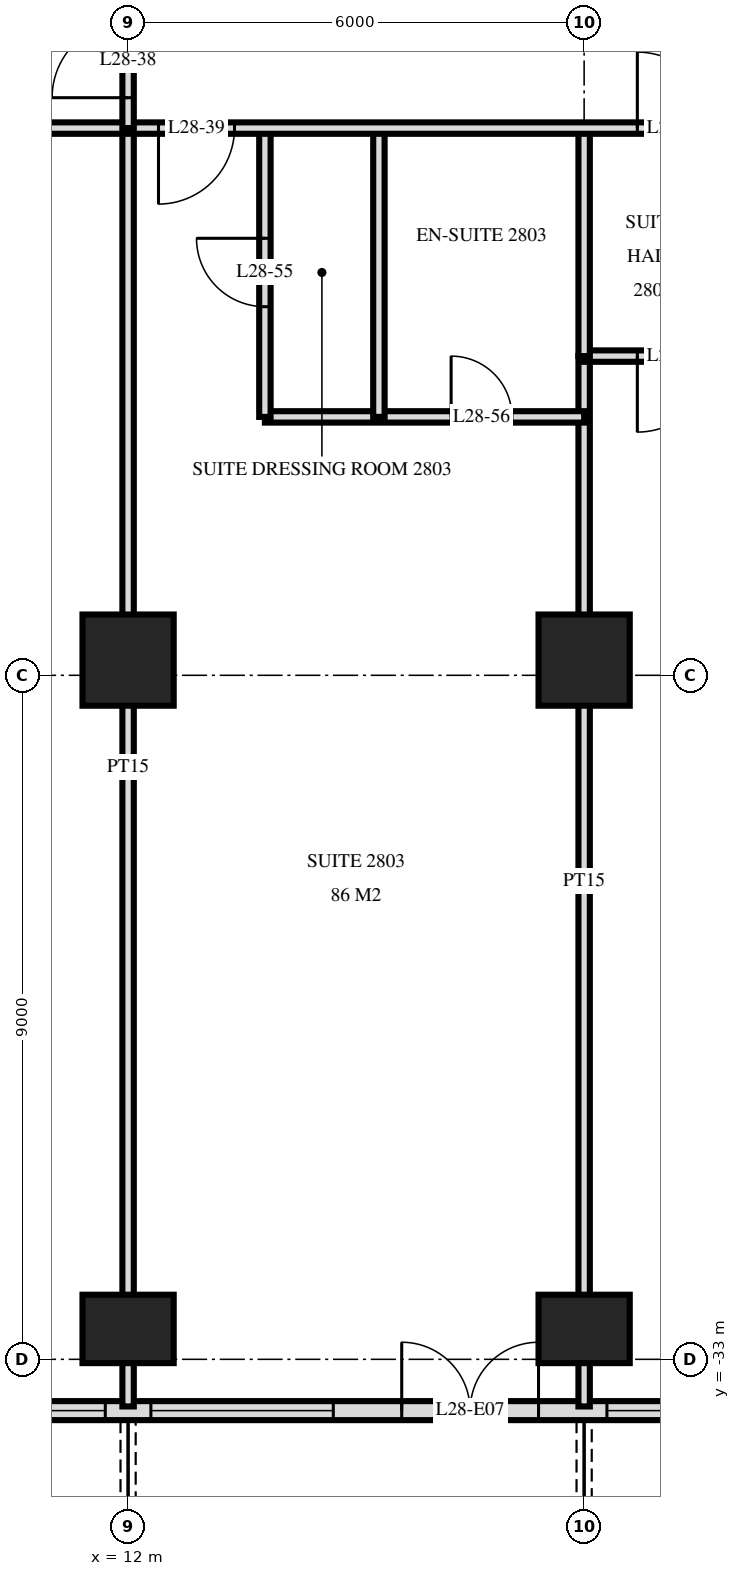
"""IFC4 building model, lengths in metres.
Left out: names, types, materials, properties, quantities, classifications, styles, units other than length and angle.
Written with IfcOpenShell. Run it as: python <this file> out.ifc"""

import sys

from ifc_helpers import new_model, si_unit, direction, frame, frame_2d, origin, origin_2d, place, context, subcontext, project, spatial, rectangle, extrude, element, fill, save


model = new_model("IFC4")
c1 = context("Model", 3, precision=1e-05, world=origin(), true_north=direction((0.0, 1.0)))
c2 = subcontext(c1, "Body", "Model", "MODEL_VIEW")
j1 = project(units=[si_unit("LENGTHUNIT", "METRE"), si_unit("PLANEANGLEUNIT", "RADIAN")], contexts=[c1])
p1 = place(None, origin())
s1 = spatial("IfcSite", under=j1, at=p1, CompositionType="ELEMENT")
p2 = place(p1, origin())
s2 = spatial("IfcBuilding", under=s1, at=p2, CompositionType="ELEMENT")
p3 = place(p2, frame((0.0, 0.0, 112.8)))
s3 = spatial("IfcBuildingStorey", under=s2, at=p3, CompositionType="ELEMENT", Elevation=112.8)
p4 = place(p3, frame((12.0, -32.6, -0.28), z_axis=(0.0, 0.0, 1.0), x_axis=(1.0, 0.0, 0.0)))
e1 = element("IfcColumn", 1, at=p4, inside=s3, PredefinedType="COLUMN", context=c2, shape_type="SweptSolid", body=[
    extrude(rectangle(XDim=1.2, YDim=0.9, at=origin_2d()), origin(), (0.0, 0.0, 1.0), 3.88),
])
p5 = place(p3, frame((12.0, -23.8, -0.28), z_axis=(0.0, 0.0, 1.0), x_axis=(1.0, 0.0, 0.0)))
e2 = element("IfcColumn", 2, at=p5, inside=s3, PredefinedType="COLUMN", context=c2, shape_type="SweptSolid", body=[
    extrude(rectangle(XDim=1.2, YDim=1.2, at=origin_2d()), origin(), (0.0, 0.0, 1.0), 3.88),
])
p6 = place(p3, frame((18.0, -32.6, -0.28), z_axis=(0.0, 0.0, 1.0), x_axis=(1.0, 0.0, 0.0)))
e3 = element("IfcColumn", 3, at=p6, inside=s3, PredefinedType="COLUMN", context=c2, shape_type="SweptSolid", body=[
    extrude(rectangle(XDim=1.2, YDim=0.9, at=origin_2d()), origin(), (0.0, 0.0, 1.0), 3.88),
])
p7 = place(p3, frame((18.0, -23.8, -0.28), z_axis=(0.0, 0.0, 1.0), x_axis=(1.0, 0.0, 0.0)))
e4 = element("IfcColumn", 4, at=p7, inside=s3, PredefinedType="COLUMN", context=c2, shape_type="SweptSolid", body=[
    extrude(rectangle(XDim=1.2, YDim=1.2, at=origin_2d()), origin(), (0.0, 0.0, 1.0), 3.88),
])
p8 = place(p3, frame((-23.675, -33.675, 0.0), z_axis=(0.0, 0.0, 1.0), x_axis=(1.0, 0.0, 0.0)))
e5 = element("IfcWall", 5, at=p8, inside=s3, PredefinedType="SOLIDWALL", context=c2, shape_type="SweptSolid", body=[
    extrude(rectangle(XDim=47.351, YDim=0.25, at=frame_2d((23.675, 0.0))), origin(), (0.0, 0.0, 1.0), 3.32),
])
p9 = place(p8, frame((0.275, 0.0, 0.3)))
e6 = element("IfcOpeningElement", 6, at=p9, cuts=e5, PredefinedType="OPENING", context=c2, shape_type="SweptSolid", body=[
    extrude(rectangle(XDim=2.4, YDim=2.1, at=frame_2d((1.2, 1.05))), frame((0.0, 0.135, 0.0), z_axis=(0.0, -1.0, 0.0), x_axis=(1.0, 0.0, 0.0)), (0.0, 0.0, 1.0), 0.27),
])
p10 = place(p8, frame((3.425, 0.0, 0.0)))
e7 = element("IfcOpeningElement", 7, at=p10, cuts=e5, PredefinedType="OPENING", context=c2, shape_type="SweptSolid", body=[
    extrude(rectangle(XDim=1.8, YDim=2.4, at=frame_2d((0.9, 1.2))), frame((0.0, 0.135, 0.0), z_axis=(0.0, -1.0, 0.0), x_axis=(1.0, 0.0, 0.0)), (0.0, 0.0, 1.0), 0.27),
])
p11 = place(p8, frame((5.975, 0.0, 0.3)))
e8 = element("IfcOpeningElement", 8, at=p11, cuts=e5, PredefinedType="OPENING", context=c2, shape_type="SweptSolid", body=[
    extrude(rectangle(XDim=2.4, YDim=2.1, at=frame_2d((1.2, 1.05))), frame((0.0, 0.135, 0.0), z_axis=(0.0, -1.0, 0.0), x_axis=(1.0, 0.0, 0.0)), (0.0, 0.0, 1.0), 0.27),
])
p12 = place(p8, frame((9.275, 0.0, 0.0)))
e9 = element("IfcOpeningElement", 9, at=p12, cuts=e5, PredefinedType="OPENING", context=c2, shape_type="SweptSolid", body=[
    extrude(rectangle(XDim=1.8, YDim=2.4, at=frame_2d((0.9, 1.2))), frame((0.0, 0.135, 0.0), z_axis=(0.0, -1.0, 0.0), x_axis=(1.0, 0.0, 0.0)), (0.0, 0.0, 1.0), 0.27),
])
p13 = place(p8, frame((12.275, 0.0, 0.0)))
e10 = element("IfcOpeningElement", 10, at=p13, cuts=e5, PredefinedType="OPENING", context=c2, shape_type="SweptSolid", body=[
    extrude(rectangle(XDim=1.8, YDim=2.4, at=frame_2d((0.9, 1.2))), frame((0.0, 0.135, 0.0), z_axis=(0.0, -1.0, 0.0), x_axis=(1.0, 0.0, 0.0)), (0.0, 0.0, 1.0), 0.27),
])
p14 = place(p8, frame((14.975, 0.0, 0.3)))
e11 = element("IfcOpeningElement", 11, at=p14, cuts=e5, PredefinedType="OPENING", context=c2, shape_type="SweptSolid", body=[
    extrude(rectangle(XDim=2.4, YDim=2.1, at=frame_2d((1.2, 1.05))), frame((0.0, 0.135, 0.0), z_axis=(0.0, -1.0, 0.0), x_axis=(1.0, 0.0, 0.0)), (0.0, 0.0, 1.0), 0.27),
])
p15 = place(p8, frame((17.975, 0.0, 0.3)))
e12 = element("IfcOpeningElement", 12, at=p15, cuts=e5, PredefinedType="OPENING", context=c2, shape_type="SweptSolid", body=[
    extrude(rectangle(XDim=2.4, YDim=2.1, at=frame_2d((1.2, 1.05))), frame((0.0, 0.135, 0.0), z_axis=(0.0, -1.0, 0.0), x_axis=(1.0, 0.0, 0.0)), (0.0, 0.0, 1.0), 0.27),
])
p16 = place(p8, frame((21.275, 0.0, 0.0)))
e13 = element("IfcOpeningElement", 13, at=p16, cuts=e5, PredefinedType="OPENING", context=c2, shape_type="SweptSolid", body=[
    extrude(rectangle(XDim=1.8, YDim=2.4, at=frame_2d((0.9, 1.2))), frame((0.0, 0.135, 0.0), z_axis=(0.0, -1.0, 0.0), x_axis=(1.0, 0.0, 0.0)), (0.0, 0.0, 1.0), 0.27),
])
p17 = place(p8, frame((24.275, 0.0, 0.0)))
e14 = element("IfcOpeningElement", 14, at=p17, cuts=e5, PredefinedType="OPENING", context=c2, shape_type="SweptSolid", body=[
    extrude(rectangle(XDim=1.8, YDim=2.4, at=frame_2d((0.9, 1.2))), frame((0.0, 0.135, 0.0), z_axis=(0.0, -1.0, 0.0), x_axis=(1.0, 0.0, 0.0)), (0.0, 0.0, 1.0), 0.27),
])
p18 = place(p8, frame((26.975, 0.0, 0.3)))
e15 = element("IfcOpeningElement", 15, at=p18, cuts=e5, PredefinedType="OPENING", context=c2, shape_type="SweptSolid", body=[
    extrude(rectangle(XDim=2.4, YDim=2.1, at=frame_2d((1.2, 1.05))), frame((0.0, 0.135, 0.0), z_axis=(0.0, -1.0, 0.0), x_axis=(1.0, 0.0, 0.0)), (0.0, 0.0, 1.0), 0.27),
])
p19 = place(p8, frame((30.275, 0.0, 0.0)))
e16 = element("IfcOpeningElement", 16, at=p19, cuts=e5, PredefinedType="OPENING", context=c2, shape_type="SweptSolid", body=[
    extrude(rectangle(XDim=1.8, YDim=2.4, at=frame_2d((0.9, 1.2))), frame((0.0, 0.135, 0.0), z_axis=(0.0, -1.0, 0.0), x_axis=(1.0, 0.0, 0.0)), (0.0, 0.0, 1.0), 0.27),
])
p20 = place(p8, frame((32.975, 0.0, 0.3)))
e17 = element("IfcOpeningElement", 17, at=p20, cuts=e5, PredefinedType="OPENING", context=c2, shape_type="SweptSolid", body=[
    extrude(rectangle(XDim=2.4, YDim=2.1, at=frame_2d((1.2, 1.05))), frame((0.0, 0.135, 0.0), z_axis=(0.0, -1.0, 0.0), x_axis=(1.0, 0.0, 0.0)), (0.0, 0.0, 1.0), 0.27),
])
p21 = place(p8, frame((35.975, 0.0, 0.3)))
e18 = element("IfcOpeningElement", 18, at=p21, cuts=e5, PredefinedType="OPENING", context=c2, shape_type="SweptSolid", body=[
    extrude(rectangle(XDim=2.4, YDim=2.1, at=frame_2d((1.2, 1.05))), frame((0.0, 0.135, 0.0), z_axis=(0.0, -1.0, 0.0), x_axis=(1.0, 0.0, 0.0)), (0.0, 0.0, 1.0), 0.27),
])
p22 = place(p8, frame((39.275, 0.0, 0.0)))
e19 = element("IfcOpeningElement", 19, at=p22, cuts=e5, PredefinedType="OPENING", context=c2, shape_type="SweptSolid", body=[
    extrude(rectangle(XDim=1.8, YDim=2.4, at=frame_2d((0.9, 1.2))), frame((0.0, 0.135, 0.0), z_axis=(0.0, -1.0, 0.0), x_axis=(1.0, 0.0, 0.0)), (0.0, 0.0, 1.0), 0.27),
])
p23 = place(p8, frame((41.975, 0.0, 0.3)))
e20 = element("IfcOpeningElement", 20, at=p23, cuts=e5, PredefinedType="OPENING", context=c2, shape_type="SweptSolid", body=[
    extrude(rectangle(XDim=2.4, YDim=2.1, at=frame_2d((1.2, 1.05))), frame((0.0, 0.135, 0.0), z_axis=(0.0, -1.0, 0.0), x_axis=(1.0, 0.0, 0.0)), (0.0, 0.0, 1.0), 0.27),
])
p24 = place(p8, frame((45.125, 0.0, 0.0)))
e21 = element("IfcOpeningElement", 21, at=p24, cuts=e5, PredefinedType="OPENING", context=c2, shape_type="SweptSolid", body=[
    extrude(rectangle(XDim=1.8, YDim=2.4, at=frame_2d((0.9, 1.2))), frame((0.0, 0.135, 0.0), z_axis=(0.0, -1.0, 0.0), x_axis=(1.0, 0.0, 0.0)), (0.0, 0.0, 1.0), 0.27),
])
p25 = place(p3, frame((18.0, -19.8, 0.0), z_axis=(0.0, 0.0, 1.0), x_axis=(0.0, 1.0, 0.0)))
e22 = element("IfcWall", 22, at=p25, inside=s3, PredefinedType="PARTITIONING", context=c2, shape_type="SweptSolid", body=[
    extrude(rectangle(XDim=3.0, YDim=0.15, at=frame_2d((1.5, 0.0))), origin(), (0.0, 0.0, 1.0), 3.32),
])
p26 = place(p3, frame((18.0, -33.62, 0.0), z_axis=(0.0, 0.0, 1.0), x_axis=(0.0, 1.0, 0.0)))
e23 = element("IfcWall", 23, at=p26, inside=s3, PredefinedType="PARTITIONING", context=c2, shape_type="SweptSolid", body=[
    extrude(rectangle(XDim=13.82, YDim=0.15, at=frame_2d((6.91, 0.0))), origin(), (0.0, 0.0, 1.0), 3.32),
])
p27 = place(p3, frame((15.3, -20.6, 0.0), z_axis=(0.0, 0.0, 1.0), x_axis=(0.0, 1.0, 0.0)))
e24 = element("IfcWall", 24, at=p27, inside=s3, PredefinedType="PARTITIONING", context=c2, shape_type="SweptSolid", body=[
    extrude(rectangle(XDim=3.8, YDim=0.15, at=frame_2d((1.9, 0.0))), origin(), (0.0, 0.0, 1.0), 3.32),
])
p28 = place(p3, frame((13.8, -20.6, 0.0), z_axis=(0.0, 0.0, 1.0), x_axis=(0.0, 1.0, 0.0)))
e25 = element("IfcWall", 25, at=p28, inside=s3, PredefinedType="PARTITIONING", context=c2, shape_type="SweptSolid", body=[
    extrude(rectangle(XDim=3.8, YDim=0.15, at=frame_2d((1.9, 0.0))), origin(), (0.0, 0.0, 1.0), 3.32),
])
p29 = place(p28, frame((1.45, 0.0, 0.0)))
e26 = element("IfcOpeningElement", 26, at=p29, cuts=e25, PredefinedType="OPENING", context=c2, shape_type="SweptSolid", body=[
    extrude(rectangle(XDim=0.9, YDim=2.1, at=frame_2d((0.45, 1.05))), frame((0.0, 0.085, 0.0), z_axis=(0.0, -1.0, 0.0), x_axis=(1.0, 0.0, 0.0)), (0.0, 0.0, 1.0), 0.17),
])
p30 = place(p3, frame((12.0, -16.8, 0.0), z_axis=(0.0, 0.0, 1.0), x_axis=(0.0, 1.0, 0.0)))
e27 = element("IfcWall", 27, at=p30, inside=s3, PredefinedType="PARTITIONING", context=c2, shape_type="SweptSolid", body=[
    extrude(rectangle(XDim=1.75, YDim=0.15, at=frame_2d((0.875, 0.0))), origin(), (0.0, 0.0, 1.0), 3.32),
])
p31 = place(p30, frame((0.4, 0.0, 0.0)))
e28 = element("IfcOpeningElement", 28, at=p31, cuts=e27, PredefinedType="OPENING", context=c2, shape_type="SweptSolid", body=[
    extrude(rectangle(XDim=1.0, YDim=2.1, at=frame_2d((0.5, 1.05))), frame((0.0, 0.085, 0.0), z_axis=(0.0, -1.0, 0.0), x_axis=(1.0, 0.0, 0.0)), (0.0, 0.0, 1.0), 0.17),
])
p32 = place(p3, frame((12.0, -33.62, 0.0), z_axis=(0.0, 0.0, 1.0), x_axis=(0.0, 1.0, 0.0)))
e29 = element("IfcWall", 29, at=p32, inside=s3, PredefinedType="PARTITIONING", context=c2, shape_type="SweptSolid", body=[
    extrude(rectangle(XDim=16.82, YDim=0.15, at=frame_2d((8.41, 0.0))), origin(), (0.0, 0.0, 1.0), 3.32),
])
p33 = place(p3, frame((13.8, -20.6, 0.0), z_axis=(0.0, 0.0, 1.0), x_axis=(1.0, 0.0, 0.0)))
e30 = element("IfcWall", 30, at=p33, inside=s3, PredefinedType="PARTITIONING", context=c2, shape_type="SweptSolid", body=[
    extrude(rectangle(XDim=4.2, YDim=0.15, at=frame_2d((2.1, 0.0))), origin(), (0.0, 0.0, 1.0), 3.32),
])
p34 = place(p33, frame((2.45, 0.0, 0.0)))
e31 = element("IfcOpeningElement", 31, at=p34, cuts=e30, PredefinedType="OPENING", context=c2, shape_type="SweptSolid", body=[
    extrude(rectangle(XDim=0.8, YDim=2.1, at=frame_2d((0.4, 1.05))), frame((0.0, 0.085, 0.0), z_axis=(0.0, -1.0, 0.0), x_axis=(1.0, 0.0, 0.0)), (0.0, 0.0, 1.0), 0.17),
])
p35 = place(p3, frame((18.0, -19.8, 0.0), z_axis=(0.0, 0.0, 1.0), x_axis=(1.0, 0.0, 0.0)))
e32 = element("IfcWall", 32, at=p35, inside=s3, PredefinedType="PARTITIONING", context=c2, shape_type="SweptSolid", body=[
    extrude(rectangle(XDim=2.4, YDim=0.15, at=frame_2d((1.2, 0.0))), origin(), (0.0, 0.0, 1.0), 3.32),
])
p36 = place(p35, frame((0.7, 0.0, 0.0)))
e33 = element("IfcOpeningElement", 33, at=p36, cuts=e32, PredefinedType="OPENING", context=c2, shape_type="SweptSolid", body=[
    extrude(rectangle(XDim=1.0, YDim=2.1, at=frame_2d((0.5, 1.05))), frame((0.0, 0.085, 0.0), z_axis=(0.0, -1.0, 0.0), x_axis=(1.0, 0.0, 0.0)), (0.0, 0.0, 1.0), 0.17),
])
p37 = place(p3, frame((-28.02, -16.8, 0.0), z_axis=(0.0, 0.0, 1.0), x_axis=(1.0, 0.0, 0.0)))
e34 = element("IfcWall", 34, at=p37, inside=s3, PredefinedType="PARTITIONING", context=c2, shape_type="SweptSolid", body=[
    extrude(rectangle(XDim=56.04, YDim=0.15, at=frame_2d((28.02, 0.0))), origin(), (0.0, 0.0, 1.0), 3.32),
])
p38 = place(p37, frame((13.17, 0.0, 0.0)))
e35 = element("IfcOpeningElement", 35, at=p38, cuts=e34, PredefinedType="OPENING", context=c2, shape_type="SweptSolid", body=[
    extrude(rectangle(XDim=1.0, YDim=2.1, at=frame_2d((0.5, 1.05))), frame((0.0, 0.085, 0.0), z_axis=(0.0, -1.0, 0.0), x_axis=(1.0, 0.0, 0.0)), (0.0, 0.0, 1.0), 0.17),
])
p39 = place(p37, frame((11.87, 0.0, 0.0)))
e36 = element("IfcOpeningElement", 36, at=p39, cuts=e34, PredefinedType="OPENING", context=c2, shape_type="SweptSolid", body=[
    extrude(rectangle(XDim=1.0, YDim=2.1, at=frame_2d((0.5, 1.05))), frame((0.0, 0.085, 0.0), z_axis=(0.0, -1.0, 0.0), x_axis=(1.0, 0.0, 0.0)), (0.0, 0.0, 1.0), 0.17),
])
p40 = place(p37, frame((8.32, 0.0, 0.0)))
e37 = element("IfcOpeningElement", 37, at=p40, cuts=e34, PredefinedType="OPENING", context=c2, shape_type="SweptSolid", body=[
    extrude(rectangle(XDim=1.0, YDim=2.1, at=frame_2d((0.5, 1.05))), frame((0.0, 0.085, 0.0), z_axis=(0.0, -1.0, 0.0), x_axis=(1.0, 0.0, 0.0)), (0.0, 0.0, 1.0), 0.17),
])
p41 = place(p37, frame((40.42, 0.0, 0.0)))
e38 = element("IfcOpeningElement", 38, at=p41, cuts=e34, PredefinedType="OPENING", context=c2, shape_type="SweptSolid", body=[
    extrude(rectangle(XDim=1.0, YDim=2.1, at=frame_2d((0.5, 1.05))), frame((0.0, 0.085, 0.0), z_axis=(0.0, -1.0, 0.0), x_axis=(1.0, 0.0, 0.0)), (0.0, 0.0, 1.0), 0.17),
])
p42 = place(p37, frame((46.72, 0.0, 0.0)))
e39 = element("IfcOpeningElement", 39, at=p42, cuts=e34, PredefinedType="OPENING", context=c2, shape_type="SweptSolid", body=[
    extrude(rectangle(XDim=1.0, YDim=2.1, at=frame_2d((0.5, 1.05))), frame((0.0, 0.085, 0.0), z_axis=(0.0, -1.0, 0.0), x_axis=(1.0, 0.0, 0.0)), (0.0, 0.0, 1.0), 0.17),
])
p43 = place(p37, frame((21.52, 0.0, 0.0)))
e40 = element("IfcOpeningElement", 40, at=p43, cuts=e34, PredefinedType="OPENING", context=c2, shape_type="SweptSolid", body=[
    extrude(rectangle(XDim=1.0, YDim=2.1, at=frame_2d((0.5, 1.05))), frame((0.0, 0.085, 0.0), z_axis=(0.0, -1.0, 0.0), x_axis=(1.0, 0.0, 0.0)), (0.0, 0.0, 1.0), 0.17),
])
p44 = place(p37, frame((30.52, 0.0, 0.0)))
e41 = element("IfcOpeningElement", 41, at=p44, cuts=e34, PredefinedType="OPENING", context=c2, shape_type="SweptSolid", body=[
    extrude(rectangle(XDim=1.0, YDim=2.1, at=frame_2d((0.5, 1.05))), frame((0.0, 0.085, 0.0), z_axis=(0.0, -1.0, 0.0), x_axis=(1.0, 0.0, 0.0)), (0.0, 0.0, 1.0), 0.17),
])
p45 = place(p37, frame((36.52, 0.0, 0.0)))
e42 = element("IfcOpeningElement", 42, at=p45, cuts=e34, PredefinedType="OPENING", context=c2, shape_type="SweptSolid", body=[
    extrude(rectangle(XDim=1.0, YDim=2.1, at=frame_2d((0.5, 1.05))), frame((0.0, 0.085, 0.0), z_axis=(0.0, -1.0, 0.0), x_axis=(1.0, 0.0, 0.0)), (0.0, 0.0, 1.0), 0.17),
])
p46 = place(p20, origin())
e43 = element("IfcWindow", 43, at=p46, inside=s3, PartitioningType="SINGLE_PANEL", PredefinedType="WINDOW", context=c2, shape_type="SweptSolid", body=[
    extrude(rectangle(XDim=2.4, YDim=2.1, at=frame_2d((1.2, 1.05))), frame((0.0, 0.03, 0.0), z_axis=(0.0, -1.0, 0.0), x_axis=(1.0, 0.0, 0.0)), (0.0, 0.0, 1.0), 0.06),
])
fill(e17, e43)
p47 = place(p21, origin())
e44 = element("IfcWindow", 44, at=p47, inside=s3, PartitioningType="SINGLE_PANEL", PredefinedType="WINDOW", context=c2, shape_type="SweptSolid", body=[
    extrude(rectangle(XDim=2.4, YDim=2.1, at=frame_2d((1.2, 1.05))), frame((0.0, 0.03, 0.0), z_axis=(0.0, -1.0, 0.0), x_axis=(1.0, 0.0, 0.0)), (0.0, 0.0, 1.0), 0.06),
])
fill(e18, e44)
p48 = place(p22, origin())
e45 = element("IfcDoor", 45, at=p48, inside=s3, OperationType="DOUBLE_DOOR_SINGLE_SWING", PredefinedType="DOOR", context=c2, shape_type="SweptSolid", body=[
    extrude(rectangle(XDim=1.8, YDim=2.4, at=frame_2d((0.9, 1.2))), frame((0.0, 0.025, 0.0), z_axis=(0.0, -1.0, 0.0), x_axis=(1.0, 0.0, 0.0)), (0.0, 0.0, 1.0), 0.05),
])
fill(e19, e45)
p49 = place(p23, origin())
e46 = element("IfcWindow", 46, at=p49, inside=s3, PartitioningType="SINGLE_PANEL", PredefinedType="WINDOW", context=c2, shape_type="SweptSolid", body=[
    extrude(rectangle(XDim=2.4, YDim=2.1, at=frame_2d((1.2, 1.05))), frame((0.0, 0.03, 0.0), z_axis=(0.0, -1.0, 0.0), x_axis=(1.0, 0.0, 0.0)), (0.0, 0.0, 1.0), 0.06),
])
fill(e20, e46)
p50 = place(p31, origin())
e47 = element("IfcDoor", 47, at=p50, inside=s3, OperationType="SINGLE_SWING_RIGHT", PredefinedType="DOOR", context=c2, shape_type="SweptSolid", body=[
    extrude(rectangle(XDim=1.0, YDim=2.1, at=frame_2d((0.5, 1.05))), frame((0.0, 0.025, 0.0), z_axis=(0.0, -1.0, 0.0), x_axis=(1.0, 0.0, 0.0)), (0.0, 0.0, 1.0), 0.05),
])
fill(e28, e47)
p51 = place(p41, frame((0.5, 0.0, 0.0), z_axis=(0.0, 0.0, 1.0), x_axis=(-1.0, 0.0, 0.0)))
e48 = element("IfcDoor", 48, at=p51, inside=s3, OperationType="SINGLE_SWING_LEFT", PredefinedType="DOOR", context=c2, shape_type="SweptSolid", body=[
    extrude(rectangle(XDim=1.0, YDim=2.1, at=frame_2d((0.0, 1.05))), frame((0.0, -0.025, 0.0), z_axis=(0.0, 1.0, 0.0), x_axis=(-1.0, 0.0, 0.0)), (0.0, 0.0, 1.0), 0.05),
])
fill(e38, e48)
p52 = place(p42, origin())
e49 = element("IfcDoor", 49, at=p52, inside=s3, OperationType="SINGLE_SWING_RIGHT", PredefinedType="DOOR", context=c2, shape_type="SweptSolid", body=[
    extrude(rectangle(XDim=1.0, YDim=2.1, at=frame_2d((0.5, 1.05))), frame((0.0, 0.025, 0.0), z_axis=(0.0, -1.0, 0.0), x_axis=(1.0, 0.0, 0.0)), (0.0, 0.0, 1.0), 0.05),
])
fill(e39, e49)
p53 = place(p29, origin())
e50 = element("IfcDoor", 50, at=p53, inside=s3, OperationType="SINGLE_SWING_LEFT", PredefinedType="DOOR", context=c2, shape_type="SweptSolid", body=[
    extrude(rectangle(XDim=0.9, YDim=2.1, at=frame_2d((0.45, 1.05))), frame((0.0, 0.025, 0.0), z_axis=(0.0, -1.0, 0.0), x_axis=(1.0, 0.0, 0.0)), (0.0, 0.0, 1.0), 0.05),
])
fill(e26, e50)
p54 = place(p34, origin())
e51 = element("IfcDoor", 51, at=p54, inside=s3, OperationType="SINGLE_SWING_RIGHT", PredefinedType="DOOR", context=c2, shape_type="SweptSolid", body=[
    extrude(rectangle(XDim=0.8, YDim=2.1, at=frame_2d((0.4, 1.05))), frame((0.0, 0.025, 0.0), z_axis=(0.0, -1.0, 0.0), x_axis=(1.0, 0.0, 0.0)), (0.0, 0.0, 1.0), 0.05),
])
fill(e31, e51)
p55 = place(p36, frame((0.5, 0.0, 0.0), z_axis=(0.0, 0.0, 1.0), x_axis=(-1.0, 0.0, 0.0)))
e52 = element("IfcDoor", 52, at=p55, inside=s3, OperationType="SINGLE_SWING_LEFT", PredefinedType="DOOR", context=c2, shape_type="SweptSolid", body=[
    extrude(rectangle(XDim=1.0, YDim=2.1, at=frame_2d((0.0, 1.05))), frame((0.0, -0.025, 0.0), z_axis=(0.0, 1.0, 0.0), x_axis=(-1.0, 0.0, 0.0)), (0.0, 0.0, 1.0), 0.05),
])
fill(e33, e52)
save(model, sys.argv[1])
